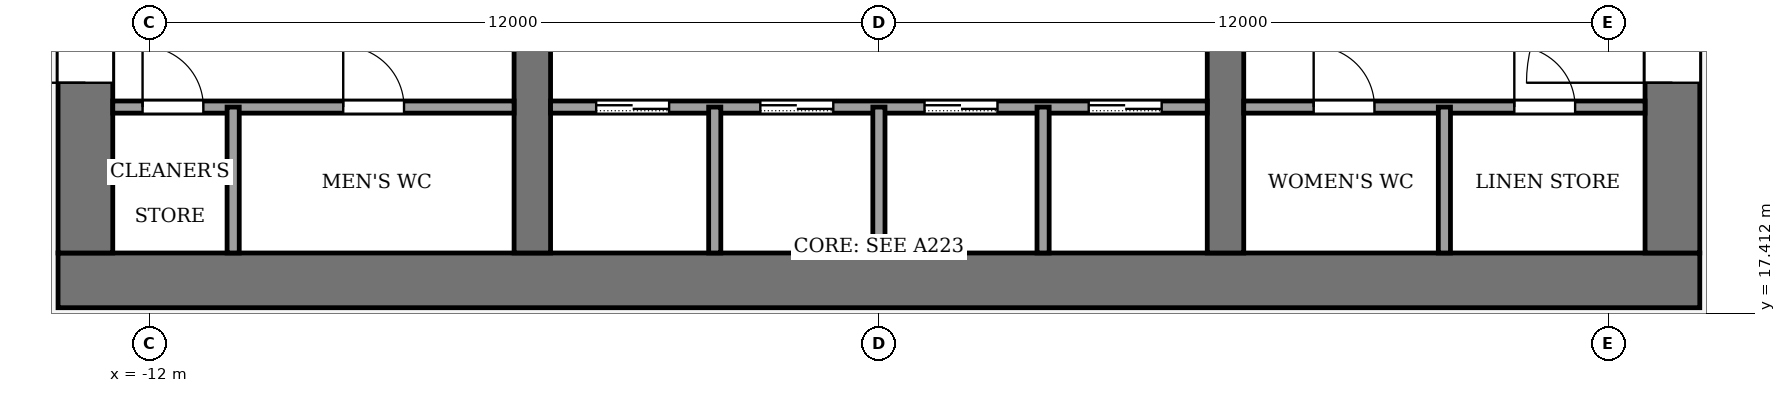
"""IFC4 building model, lengths in metres.
Left out: names, types, materials, properties, quantities, classifications, styles, units other than length and angle.
Written with IfcOpenShell. Run it as: python <this file> out.ifc"""

import sys

from ifc_helpers import new_model, si_unit, direction, frame, frame_2d, origin, place, context, subcontext, project, spatial, rectangle, extrude, element, fill, save


model = new_model("IFC4")
c1 = context("Model", 3, precision=1e-05, world=origin(), true_north=direction((0.0, 1.0)))
c2 = subcontext(c1, "Body", "Model", "MODEL_VIEW")
j1 = project(units=[si_unit("LENGTHUNIT", "METRE"), si_unit("PLANEANGLEUNIT", "RADIAN")], contexts=[c1])
p1 = place(None, origin())
s1 = spatial("IfcSite", under=j1, at=p1, CompositionType="ELEMENT")
p2 = place(p1, origin())
s2 = spatial("IfcBuilding", under=s1, at=p2, CompositionType="ELEMENT")
p3 = place(p2, frame((0.0, 0.0, 210.0)))
s3 = spatial("IfcBuildingStorey", under=s2, at=p3, CompositionType="ELEMENT", Elevation=210.0)
p4 = place(p3, frame((-13.5, 17.95, -0.13), z_axis=(0.0, 0.0, 1.0), x_axis=(1.0, 0.0, 0.0)))
e1 = element("IfcWall", 1, at=p4, inside=s3, PredefinedType="SHEAR", context=c2, shape_type="SweptSolid", body=[
    extrude(rectangle(XDim=27.0, YDim=0.9, at=frame_2d((13.5, 0.0))), origin(), (0.0, 0.0, 1.0), 4.0),
])
p5 = place(p3, frame((-13.05, 18.4, -0.13), z_axis=(0.0, 0.0, 1.0), x_axis=(0.0, 1.0, 0.0)))
e2 = element("IfcWall", 2, at=p5, inside=s3, PredefinedType="SHEAR", context=c2, shape_type="SweptSolid", body=[
    extrude(rectangle(XDim=19.2, YDim=0.9, at=frame_2d((9.6, 0.0))), origin(), (0.0, 0.0, 1.0), 4.0),
])
p6 = place(p5, frame((2.8, 0.0, 0.13)))
e3 = element("IfcOpeningElement", 3, at=p6, cuts=e2, PredefinedType="OPENING", context=c2, shape_type="SweptSolid", body=[
    extrude(rectangle(XDim=2.4, YDim=2.4, at=frame_2d((1.2, 1.2))), frame((0.0, 0.46, 0.0), z_axis=(0.0, -1.0, 0.0), x_axis=(1.0, 0.0, 0.0)), (0.0, 0.0, 1.0), 0.92),
])
p7 = place(p5, frame((13.4, 0.0, 0.13)))
e4 = element("IfcOpeningElement", 4, at=p7, cuts=e2, PredefinedType="OPENING", context=c2, shape_type="SweptSolid", body=[
    extrude(rectangle(XDim=1.4, YDim=2.2, at=frame_2d((0.7, 1.1))), frame((0.0, 0.46, 0.0), z_axis=(0.0, -1.0, 0.0), x_axis=(1.0, 0.0, 0.0)), (0.0, 0.0, 1.0), 0.92),
])
p8 = place(p3, frame((13.05, 18.4, -0.13), z_axis=(0.0, 0.0, 1.0), x_axis=(0.0, 1.0, 0.0)))
e5 = element("IfcWall", 5, at=p8, inside=s3, PredefinedType="SHEAR", context=c2, shape_type="SweptSolid", body=[
    extrude(rectangle(XDim=19.2, YDim=0.9, at=frame_2d((9.6, 0.0))), origin(), (0.0, 0.0, 1.0), 4.0),
])
p9 = place(p8, frame((2.8, 0.0, 0.13)))
e6 = element("IfcOpeningElement", 6, at=p9, cuts=e5, PredefinedType="OPENING", context=c2, shape_type="SweptSolid", body=[
    extrude(rectangle(XDim=2.4, YDim=2.4, at=frame_2d((1.2, 1.2))), frame((0.0, 0.46, 0.0), z_axis=(0.0, -1.0, 0.0), x_axis=(1.0, 0.0, 0.0)), (0.0, 0.0, 1.0), 0.92),
])
p10 = place(p8, frame((13.3, 0.0, 0.13)))
e7 = element("IfcOpeningElement", 7, at=p10, cuts=e5, PredefinedType="OPENING", context=c2, shape_type="SweptSolid", body=[
    extrude(rectangle(XDim=2.4, YDim=2.4, at=frame_2d((1.2, 1.2))), frame((0.0, 0.46, 0.0), z_axis=(0.0, -1.0, 0.0), x_axis=(1.0, 0.0, 0.0)), (0.0, 0.0, 1.0), 0.92),
])
p11 = place(p3, frame((-5.7, 18.4, -0.13), z_axis=(0.0, 0.0, 1.0), x_axis=(0.0, 1.0, 0.0)))
e8 = element("IfcWall", 8, at=p11, inside=s3, PredefinedType="SHEAR", context=c2, shape_type="SweptSolid", body=[
    extrude(rectangle(XDim=19.2, YDim=0.6, at=frame_2d((9.6, 0.0))), origin(), (0.0, 0.0, 1.0), 4.0),
])
p12 = place(p11, frame((8.35, 0.0, 0.13)))
e9 = element("IfcOpeningElement", 9, at=p12, cuts=e8, PredefinedType="OPENING", context=c2, shape_type="SweptSolid", body=[
    extrude(rectangle(XDim=0.9, YDim=2.1, at=frame_2d((0.45, 1.05))), frame((0.0, 0.31, 0.0), z_axis=(0.0, -1.0, 0.0), x_axis=(1.0, 0.0, 0.0)), (0.0, 0.0, 1.0), 0.62),
])
p13 = place(p3, frame((5.7, 18.4, -0.13), z_axis=(0.0, 0.0, 1.0), x_axis=(0.0, 1.0, 0.0)))
e10 = element("IfcWall", 10, at=p13, inside=s3, PredefinedType="SHEAR", context=c2, shape_type="SweptSolid", body=[
    extrude(rectangle(XDim=19.2, YDim=0.6, at=frame_2d((9.6, 0.0))), origin(), (0.0, 0.0, 1.0), 4.0),
])
p14 = place(p13, frame((13.3, 0.0, 0.13)))
e11 = element("IfcOpeningElement", 11, at=p14, cuts=e10, PredefinedType="OPENING", context=c2, shape_type="SweptSolid", body=[
    extrude(rectangle(XDim=2.4, YDim=2.4, at=frame_2d((1.2, 1.2))), frame((0.0, 0.31, 0.0), z_axis=(0.0, -1.0, 0.0), x_axis=(1.0, 0.0, 0.0)), (0.0, 0.0, 1.0), 0.62),
])
p15 = place(p3, frame((-12.6, 20.8, 0.0), z_axis=(0.0, 0.0, 1.0), x_axis=(1.0, 0.0, 0.0)))
e12 = element("IfcWall", 12, at=p15, inside=s3, PredefinedType="PARTITIONING", context=c2, shape_type="SweptSolid", body=[
    extrude(rectangle(XDim=6.6, YDim=0.2, at=frame_2d((3.3, 0.0))), origin(), (0.0, 0.0, 1.0), 3.87),
])
p16 = place(p15, frame((0.49, 0.0, 0.0)))
e13 = element("IfcOpeningElement", 13, at=p16, cuts=e12, PredefinedType="OPENING", context=c2, shape_type="SweptSolid", body=[
    extrude(rectangle(XDim=1.0, YDim=2.1, at=frame_2d((0.5, 1.05))), frame((0.0, 0.11, 0.0), z_axis=(0.0, -1.0, 0.0), x_axis=(1.0, 0.0, 0.0)), (0.0, 0.0, 1.0), 0.22),
])
p17 = place(p15, frame((3.79, 0.0, 0.0)))
e14 = element("IfcOpeningElement", 14, at=p17, cuts=e12, PredefinedType="OPENING", context=c2, shape_type="SweptSolid", body=[
    extrude(rectangle(XDim=1.0, YDim=2.1, at=frame_2d((0.5, 1.05))), frame((0.0, 0.11, 0.0), z_axis=(0.0, -1.0, 0.0), x_axis=(1.0, 0.0, 0.0)), (0.0, 0.0, 1.0), 0.22),
])
p18 = place(p3, frame((-5.4, 20.8, 0.0), z_axis=(0.0, 0.0, 1.0), x_axis=(1.0, 0.0, 0.0)))
e15 = element("IfcWall", 15, at=p18, inside=s3, PredefinedType="PARTITIONING", context=c2, shape_type="SweptSolid", body=[
    extrude(rectangle(XDim=10.8, YDim=0.2, at=frame_2d((5.4, 0.0))), origin(), (0.0, 0.0, 1.0), 3.87),
])
p19 = place(p18, frame((0.75, 0.0, 0.0)))
e16 = element("IfcOpeningElement", 16, at=p19, cuts=e15, PredefinedType="OPENING", context=c2, shape_type="SweptSolid", body=[
    extrude(rectangle(XDim=1.2, YDim=2.2, at=frame_2d((0.6, 1.1))), frame((0.0, 0.11, 0.0), z_axis=(0.0, -1.0, 0.0), x_axis=(1.0, 0.0, 0.0)), (0.0, 0.0, 1.0), 0.22),
])
p20 = place(p18, frame((3.45, 0.0, 0.0)))
e17 = element("IfcOpeningElement", 17, at=p20, cuts=e15, PredefinedType="OPENING", context=c2, shape_type="SweptSolid", body=[
    extrude(rectangle(XDim=1.2, YDim=2.2, at=frame_2d((0.6, 1.1))), frame((0.0, 0.11, 0.0), z_axis=(0.0, -1.0, 0.0), x_axis=(1.0, 0.0, 0.0)), (0.0, 0.0, 1.0), 0.22),
])
p21 = place(p18, frame((6.15, 0.0, 0.0)))
e18 = element("IfcOpeningElement", 18, at=p21, cuts=e15, PredefinedType="OPENING", context=c2, shape_type="SweptSolid", body=[
    extrude(rectangle(XDim=1.2, YDim=2.2, at=frame_2d((0.6, 1.1))), frame((0.0, 0.11, 0.0), z_axis=(0.0, -1.0, 0.0), x_axis=(1.0, 0.0, 0.0)), (0.0, 0.0, 1.0), 0.22),
])
p22 = place(p18, frame((8.85, 0.0, 0.0)))
e19 = element("IfcOpeningElement", 19, at=p22, cuts=e15, PredefinedType="OPENING", context=c2, shape_type="SweptSolid", body=[
    extrude(rectangle(XDim=1.2, YDim=2.2, at=frame_2d((0.6, 1.1))), frame((0.0, 0.11, 0.0), z_axis=(0.0, -1.0, 0.0), x_axis=(1.0, 0.0, 0.0)), (0.0, 0.0, 1.0), 0.22),
])
p23 = place(p3, frame((6.0, 20.8, 0.0), z_axis=(0.0, 0.0, 1.0), x_axis=(1.0, 0.0, 0.0)))
e20 = element("IfcWall", 20, at=p23, inside=s3, PredefinedType="PARTITIONING", context=c2, shape_type="SweptSolid", body=[
    extrude(rectangle(XDim=6.6, YDim=0.2, at=frame_2d((3.3, 0.0))), origin(), (0.0, 0.0, 1.0), 3.87),
])
p24 = place(p23, frame((1.15, 0.0, 0.0)))
e21 = element("IfcOpeningElement", 21, at=p24, cuts=e20, PredefinedType="OPENING", context=c2, shape_type="SweptSolid", body=[
    extrude(rectangle(XDim=1.0, YDim=2.1, at=frame_2d((0.5, 1.05))), frame((0.0, 0.11, 0.0), z_axis=(0.0, -1.0, 0.0), x_axis=(1.0, 0.0, 0.0)), (0.0, 0.0, 1.0), 0.22),
])
p25 = place(p23, frame((4.45, 0.0, 0.0)))
e22 = element("IfcOpeningElement", 22, at=p25, cuts=e20, PredefinedType="OPENING", context=c2, shape_type="SweptSolid", body=[
    extrude(rectangle(XDim=1.0, YDim=2.1, at=frame_2d((0.5, 1.05))), frame((0.0, 0.11, 0.0), z_axis=(0.0, -1.0, 0.0), x_axis=(1.0, 0.0, 0.0)), (0.0, 0.0, 1.0), 0.22),
])
for number, where, z_axis, x_axis in (
    (23, (-10.62, 18.4, 0.0), (0.0, 0.0, 1.0), (0.0, 1.0, 0.0)),
    (24, (-2.7, 18.4, 0.0), (0.0, 0.0, 1.0), (0.0, 1.0, 0.0)),
    (25, (0.0, 18.4, 0.0), (0.0, 0.0, 1.0), (0.0, 1.0, 0.0)),
    (26, (2.7, 18.4, 0.0), (0.0, 0.0, 1.0), (0.0, 1.0, 0.0)),
    (27, (9.3, 18.4, 0.0), (0.0, 0.0, 1.0), (0.0, 1.0, 0.0)),
):
    element("IfcWall", number, at=place(p3, frame(where, z_axis=z_axis, x_axis=x_axis)), inside=s3, PredefinedType="PARTITIONING", context=c2, shape_type="SweptSolid", body=[
        extrude(rectangle(XDim=2.4, YDim=0.2, at=frame_2d((1.2, 0.0))), origin(), (0.0, 0.0, 1.0), 3.87),
    ])
p26 = place(p19, origin())
e28 = element("IfcDoor", 28, at=p26, inside=s3, OperationType="SLIDING_TO_LEFT", PredefinedType="DOOR", context=c2, shape_type="SweptSolid", body=[
    extrude(rectangle(XDim=1.2, YDim=2.2, at=frame_2d((0.6, 1.1))), frame((0.0, 0.025, 0.0), z_axis=(0.0, -1.0, 0.0), x_axis=(1.0, 0.0, 0.0)), (0.0, 0.0, 1.0), 0.05),
])
fill(e16, e28)
p27 = place(p20, origin())
e29 = element("IfcDoor", 29, at=p27, inside=s3, OperationType="SLIDING_TO_LEFT", PredefinedType="DOOR", context=c2, shape_type="SweptSolid", body=[
    extrude(rectangle(XDim=1.2, YDim=2.2, at=frame_2d((0.6, 1.1))), frame((0.0, 0.025, 0.0), z_axis=(0.0, -1.0, 0.0), x_axis=(1.0, 0.0, 0.0)), (0.0, 0.0, 1.0), 0.05),
])
fill(e17, e29)
p28 = place(p21, origin())
e30 = element("IfcDoor", 30, at=p28, inside=s3, OperationType="SLIDING_TO_LEFT", PredefinedType="DOOR", context=c2, shape_type="SweptSolid", body=[
    extrude(rectangle(XDim=1.2, YDim=2.2, at=frame_2d((0.6, 1.1))), frame((0.0, 0.025, 0.0), z_axis=(0.0, -1.0, 0.0), x_axis=(1.0, 0.0, 0.0)), (0.0, 0.0, 1.0), 0.05),
])
fill(e18, e30)
p29 = place(p22, origin())
e31 = element("IfcDoor", 31, at=p29, inside=s3, OperationType="SLIDING_TO_LEFT", PredefinedType="DOOR", context=c2, shape_type="SweptSolid", body=[
    extrude(rectangle(XDim=1.2, YDim=2.2, at=frame_2d((0.6, 1.1))), frame((0.0, 0.025, 0.0), z_axis=(0.0, -1.0, 0.0), x_axis=(1.0, 0.0, 0.0)), (0.0, 0.0, 1.0), 0.05),
])
fill(e19, e31)
p30 = place(p16, origin())
e32 = element("IfcDoor", 32, at=p30, inside=s3, OperationType="SINGLE_SWING_RIGHT", PredefinedType="DOOR", context=c2, shape_type="SweptSolid", body=[
    extrude(rectangle(XDim=1.0, YDim=2.1, at=frame_2d((0.5, 1.05))), frame((0.0, 0.025, 0.0), z_axis=(0.0, -1.0, 0.0), x_axis=(1.0, 0.0, 0.0)), (0.0, 0.0, 1.0), 0.05),
])
fill(e13, e32)
p31 = place(p17, origin())
e33 = element("IfcDoor", 33, at=p31, inside=s3, OperationType="SINGLE_SWING_RIGHT", PredefinedType="DOOR", context=c2, shape_type="SweptSolid", body=[
    extrude(rectangle(XDim=1.0, YDim=2.1, at=frame_2d((0.5, 1.05))), frame((0.0, 0.025, 0.0), z_axis=(0.0, -1.0, 0.0), x_axis=(1.0, 0.0, 0.0)), (0.0, 0.0, 1.0), 0.05),
])
fill(e14, e33)
p32 = place(p24, origin())
e34 = element("IfcDoor", 34, at=p32, inside=s3, OperationType="SINGLE_SWING_LEFT", PredefinedType="DOOR", context=c2, shape_type="SweptSolid", body=[
    extrude(rectangle(XDim=1.0, YDim=2.1, at=frame_2d((0.5, 1.05))), frame((0.0, 0.025, 0.0), z_axis=(0.0, -1.0, 0.0), x_axis=(1.0, 0.0, 0.0)), (0.0, 0.0, 1.0), 0.05),
])
fill(e21, e34)
p33 = place(p25, origin())
e35 = element("IfcDoor", 35, at=p33, inside=s3, OperationType="SINGLE_SWING_LEFT", PredefinedType="DOOR", context=c2, shape_type="SweptSolid", body=[
    extrude(rectangle(XDim=1.0, YDim=2.1, at=frame_2d((0.5, 1.05))), frame((0.0, 0.025, 0.0), z_axis=(0.0, -1.0, 0.0), x_axis=(1.0, 0.0, 0.0)), (0.0, 0.0, 1.0), 0.05),
])
fill(e22, e35)
p34 = place(p6, origin())
e36 = element("IfcDoor", 36, at=p34, inside=s3, OperationType="DOUBLE_DOOR_SINGLE_SWING", PredefinedType="DOOR", context=c2, shape_type="SweptSolid", body=[
    extrude(rectangle(XDim=2.4, YDim=2.4, at=frame_2d((1.2, 1.2))), frame((0.0, 0.025, 0.0), z_axis=(0.0, -1.0, 0.0), x_axis=(1.0, 0.0, 0.0)), (0.0, 0.0, 1.0), 0.05),
])
fill(e3, e36)
p35 = place(p9, origin())
e37 = element("IfcDoor", 37, at=p35, inside=s3, OperationType="DOUBLE_DOOR_SINGLE_SWING", PredefinedType="DOOR", context=c2, shape_type="SweptSolid", body=[
    extrude(rectangle(XDim=2.4, YDim=2.4, at=frame_2d((1.2, 1.2))), frame((0.0, 0.025, 0.0), z_axis=(0.0, -1.0, 0.0), x_axis=(1.0, 0.0, 0.0)), (0.0, 0.0, 1.0), 0.05),
])
fill(e6, e37)
save(model, sys.argv[1])
